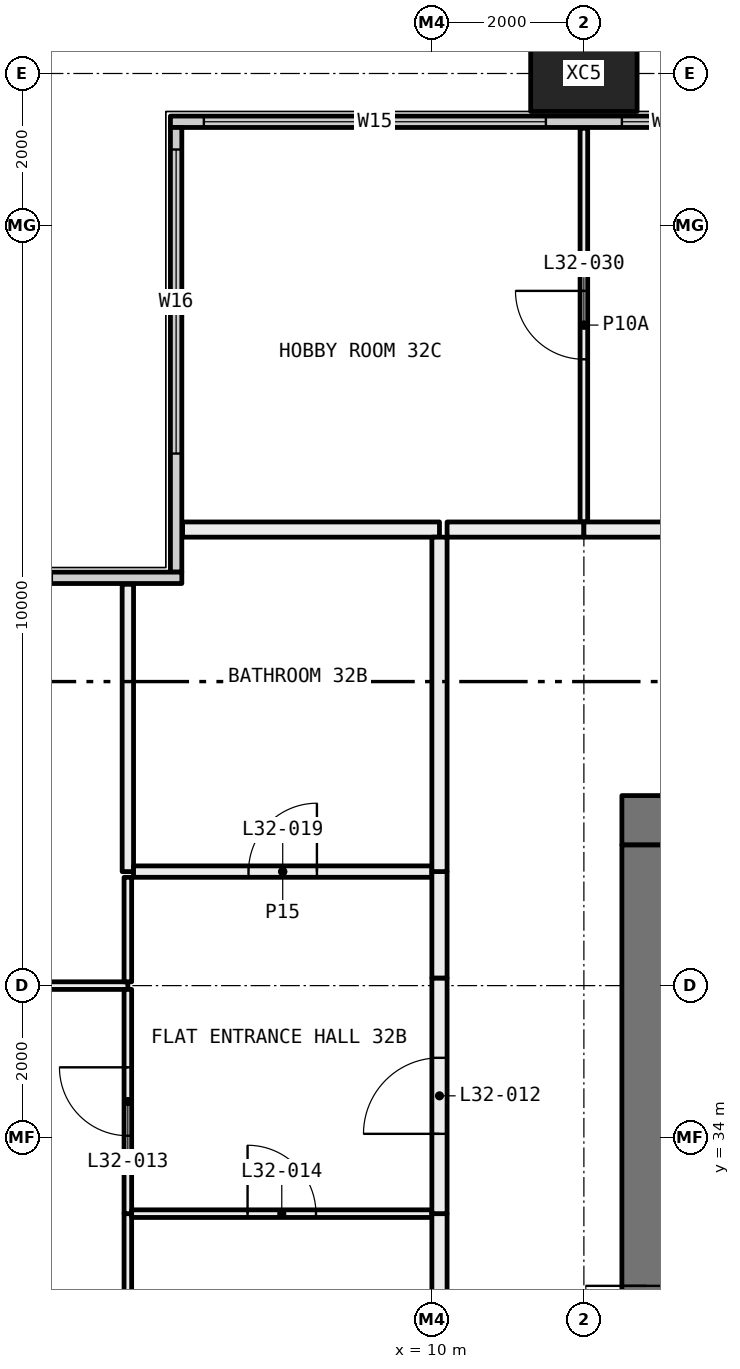
"""IFC4 building model, lengths in metres.
Left out: names, types, materials, properties, quantities, classifications, styles, units other than length and angle.
Written with IfcOpenShell. Run it as: python <this file> out.ifc"""

import sys

from ifc_helpers import new_model, si_unit, direction, frame, frame_2d, origin, origin_2d, place, context, subcontext, project, spatial, rectangle, hollow_rectangle, extrude, element, fill, save


model = new_model("IFC4")
c1 = context("Model", 3, precision=1e-05, world=origin(), true_north=direction((0.0, 1.0)))
c2 = subcontext(c1, "Body", "Model", "MODEL_VIEW")
j1 = project(units=[si_unit("LENGTHUNIT", "METRE"), si_unit("PLANEANGLEUNIT", "RADIAN")], contexts=[c1])
p1 = place(None, origin())
s1 = spatial("IfcSite", under=j1, at=p1, CompositionType="ELEMENT")
p2 = place(p1, origin())
s2 = spatial("IfcBuilding", under=s1, at=p2, CompositionType="ELEMENT")
p3 = place(p2, frame((0.0, 0.0, 124.2)))
s3 = spatial("IfcBuildingStorey", under=s2, at=p3, CompositionType="ELEMENT", Elevation=124.2)
p4 = place(p3, frame((12.0, 48.0, -0.4), z_axis=(0.0, 0.0, 1.0), x_axis=(1.0, 0.0, 0.0)))
e1 = element("IfcColumn", 1, at=p4, inside=s3, PredefinedType="COLUMN", context=c2, shape_type="SweptSolid", body=[
    extrude(hollow_rectangle(XDim=1.4, YDim=1.0, WallThickness=0.055, at=origin_2d()), origin(), (0.0, 0.0, 1.0), 3.45),
])
p5 = place(p3, frame((6.56, 47.365, 0.0), z_axis=(0.0, 0.0, 1.0), x_axis=(1.0, 0.0, 0.0)))
e2 = element("IfcWall", 2, at=p5, inside=s3, PredefinedType="ELEMENTEDWALL", context=c2, shape_type="SweptSolid", body=[
    extrude(rectangle(XDim=58.88, YDim=0.15, at=frame_2d((29.44, 0.0))), origin(), (0.0, 0.0, 1.0), 3.05),
])
p6 = place(p5, frame((0.44, 0.0, 0.45)))
e3 = element("IfcOpeningElement", 3, at=p6, cuts=e2, PredefinedType="OPENING", context=c2, shape_type="SweptSolid", body=[
    extrude(rectangle(XDim=4.5, YDim=2.55, at=frame_2d((2.25, 1.275))), frame((0.0, 0.085, 0.0), z_axis=(0.0, -1.0, 0.0), x_axis=(1.0, 0.0, 0.0)), (0.0, 0.0, 1.0), 0.17),
])
p7 = place(p5, frame((5.94, 0.0, 0.45)))
e4 = element("IfcOpeningElement", 4, at=p7, cuts=e2, PredefinedType="OPENING", context=c2, shape_type="SweptSolid", body=[
    extrude(rectangle(XDim=1.25, YDim=2.55, at=frame_2d((0.625, 1.275))), frame((0.0, 0.085, 0.0), z_axis=(0.0, -1.0, 0.0), x_axis=(1.0, 0.0, 0.0)), (0.0, 0.0, 1.0), 0.17),
])
p8 = place(p5, frame((10.19, 0.0, 0.45)))
e5 = element("IfcOpeningElement", 5, at=p8, cuts=e2, PredefinedType="OPENING", context=c2, shape_type="SweptSolid", body=[
    extrude(rectangle(XDim=0.75, YDim=2.55, at=frame_2d((0.375, 1.275))), frame((0.0, 0.085, 0.0), z_axis=(0.0, -1.0, 0.0), x_axis=(1.0, 0.0, 0.0)), (0.0, 0.0, 1.0), 0.17),
])
p9 = place(p5, frame((11.94, 0.0, 0.45)))
e6 = element("IfcOpeningElement", 6, at=p9, cuts=e2, PredefinedType="OPENING", context=c2, shape_type="SweptSolid", body=[
    extrude(rectangle(XDim=0.75, YDim=2.55, at=frame_2d((0.375, 1.275))), frame((0.0, 0.085, 0.0), z_axis=(0.0, -1.0, 0.0), x_axis=(1.0, 0.0, 0.0)), (0.0, 0.0, 1.0), 0.17),
])
p10 = place(p5, frame((15.69, 0.0, 0.45)))
e7 = element("IfcOpeningElement", 7, at=p10, cuts=e2, PredefinedType="OPENING", context=c2, shape_type="SweptSolid", body=[
    extrude(rectangle(XDim=1.25, YDim=2.55, at=frame_2d((0.625, 1.275))), frame((0.0, 0.085, 0.0), z_axis=(0.0, -1.0, 0.0), x_axis=(1.0, 0.0, 0.0)), (0.0, 0.0, 1.0), 0.17),
])
p11 = place(p5, frame((17.94, 0.0, 0.45)))
e8 = element("IfcOpeningElement", 8, at=p11, cuts=e2, PredefinedType="OPENING", context=c2, shape_type="SweptSolid", body=[
    extrude(rectangle(XDim=1.25, YDim=2.55, at=frame_2d((0.625, 1.275))), frame((0.0, 0.085, 0.0), z_axis=(0.0, -1.0, 0.0), x_axis=(1.0, 0.0, 0.0)), (0.0, 0.0, 1.0), 0.17),
])
p12 = place(p5, frame((22.19, 0.0, 0.45)))
e9 = element("IfcOpeningElement", 9, at=p12, cuts=e2, PredefinedType="OPENING", context=c2, shape_type="SweptSolid", body=[
    extrude(rectangle(XDim=0.75, YDim=2.55, at=frame_2d((0.375, 1.275))), frame((0.0, 0.085, 0.0), z_axis=(0.0, -1.0, 0.0), x_axis=(1.0, 0.0, 0.0)), (0.0, 0.0, 1.0), 0.17),
])
p13 = place(p5, frame((23.94, 0.0, 0.45)))
e10 = element("IfcOpeningElement", 10, at=p13, cuts=e2, PredefinedType="OPENING", context=c2, shape_type="SweptSolid", body=[
    extrude(rectangle(XDim=0.75, YDim=2.55, at=frame_2d((0.375, 1.275))), frame((0.0, 0.085, 0.0), z_axis=(0.0, -1.0, 0.0), x_axis=(1.0, 0.0, 0.0)), (0.0, 0.0, 1.0), 0.17),
])
p14 = place(p5, frame((27.69, 0.0, 0.45)))
e11 = element("IfcOpeningElement", 11, at=p14, cuts=e2, PredefinedType="OPENING", context=c2, shape_type="SweptSolid", body=[
    extrude(rectangle(XDim=1.25, YDim=2.55, at=frame_2d((0.625, 1.275))), frame((0.0, 0.085, 0.0), z_axis=(0.0, -1.0, 0.0), x_axis=(1.0, 0.0, 0.0)), (0.0, 0.0, 1.0), 0.17),
])
p15 = place(p5, frame((29.94, 0.0, 0.45)))
e12 = element("IfcOpeningElement", 12, at=p15, cuts=e2, PredefinedType="OPENING", context=c2, shape_type="SweptSolid", body=[
    extrude(rectangle(XDim=1.25, YDim=2.55, at=frame_2d((0.625, 1.275))), frame((0.0, 0.085, 0.0), z_axis=(0.0, -1.0, 0.0), x_axis=(1.0, 0.0, 0.0)), (0.0, 0.0, 1.0), 0.17),
])
p16 = place(p5, frame((34.19, 0.0, 0.45)))
e13 = element("IfcOpeningElement", 13, at=p16, cuts=e2, PredefinedType="OPENING", context=c2, shape_type="SweptSolid", body=[
    extrude(rectangle(XDim=0.75, YDim=2.55, at=frame_2d((0.375, 1.275))), frame((0.0, 0.085, 0.0), z_axis=(0.0, -1.0, 0.0), x_axis=(1.0, 0.0, 0.0)), (0.0, 0.0, 1.0), 0.17),
])
p17 = place(p5, frame((35.94, 0.0, 0.45)))
e14 = element("IfcOpeningElement", 14, at=p17, cuts=e2, PredefinedType="OPENING", context=c2, shape_type="SweptSolid", body=[
    extrude(rectangle(XDim=0.75, YDim=2.55, at=frame_2d((0.375, 1.275))), frame((0.0, 0.085, 0.0), z_axis=(0.0, -1.0, 0.0), x_axis=(1.0, 0.0, 0.0)), (0.0, 0.0, 1.0), 0.17),
])
p18 = place(p5, frame((39.69, 0.0, 0.45)))
e15 = element("IfcOpeningElement", 15, at=p18, cuts=e2, PredefinedType="OPENING", context=c2, shape_type="SweptSolid", body=[
    extrude(rectangle(XDim=1.25, YDim=2.55, at=frame_2d((0.625, 1.275))), frame((0.0, 0.085, 0.0), z_axis=(0.0, -1.0, 0.0), x_axis=(1.0, 0.0, 0.0)), (0.0, 0.0, 1.0), 0.17),
])
p19 = place(p5, frame((41.94, 0.0, 0.45)))
e16 = element("IfcOpeningElement", 16, at=p19, cuts=e2, PredefinedType="OPENING", context=c2, shape_type="SweptSolid", body=[
    extrude(rectangle(XDim=1.25, YDim=2.55, at=frame_2d((0.625, 1.275))), frame((0.0, 0.085, 0.0), z_axis=(0.0, -1.0, 0.0), x_axis=(1.0, 0.0, 0.0)), (0.0, 0.0, 1.0), 0.17),
])
p20 = place(p5, frame((46.19, 0.0, 0.45)))
e17 = element("IfcOpeningElement", 17, at=p20, cuts=e2, PredefinedType="OPENING", context=c2, shape_type="SweptSolid", body=[
    extrude(rectangle(XDim=0.75, YDim=2.55, at=frame_2d((0.375, 1.275))), frame((0.0, 0.085, 0.0), z_axis=(0.0, -1.0, 0.0), x_axis=(1.0, 0.0, 0.0)), (0.0, 0.0, 1.0), 0.17),
])
p21 = place(p5, frame((47.94, 0.0, 0.45)))
e18 = element("IfcOpeningElement", 18, at=p21, cuts=e2, PredefinedType="OPENING", context=c2, shape_type="SweptSolid", body=[
    extrude(rectangle(XDim=0.75, YDim=2.55, at=frame_2d((0.375, 1.275))), frame((0.0, 0.085, 0.0), z_axis=(0.0, -1.0, 0.0), x_axis=(1.0, 0.0, 0.0)), (0.0, 0.0, 1.0), 0.17),
])
p22 = place(p5, frame((51.69, 0.0, 0.45)))
e19 = element("IfcOpeningElement", 19, at=p22, cuts=e2, PredefinedType="OPENING", context=c2, shape_type="SweptSolid", body=[
    extrude(rectangle(XDim=1.25, YDim=2.55, at=frame_2d((0.625, 1.275))), frame((0.0, 0.085, 0.0), z_axis=(0.0, -1.0, 0.0), x_axis=(1.0, 0.0, 0.0)), (0.0, 0.0, 1.0), 0.17),
])
p23 = place(p5, frame((53.94, 0.0, 0.45)))
e20 = element("IfcOpeningElement", 20, at=p23, cuts=e2, PredefinedType="OPENING", context=c2, shape_type="SweptSolid", body=[
    extrude(rectangle(XDim=4.5, YDim=2.55, at=frame_2d((2.25, 1.275))), frame((0.0, 0.085, 0.0), z_axis=(0.0, -1.0, 0.0), x_axis=(1.0, 0.0, 0.0)), (0.0, 0.0, 1.0), 0.17),
])
p24 = place(p3, frame((6.635, 41.44, 0.0), z_axis=(0.0, 0.0, 1.0), x_axis=(0.0, 1.0, 0.0)))
e21 = element("IfcWall", 21, at=p24, inside=s3, PredefinedType="ELEMENTEDWALL", context=c2, shape_type="SweptSolid", body=[
    extrude(rectangle(XDim=5.85, YDim=0.15, at=frame_2d((2.925, 0.0))), origin(), (0.0, 0.0, 1.0), 3.05),
])
p25 = place(p24, frame((1.56, 0.0, 0.45)))
e22 = element("IfcOpeningElement", 22, at=p25, cuts=e21, PredefinedType="OPENING", context=c2, shape_type="SweptSolid", body=[
    extrude(rectangle(XDim=4.0, YDim=2.55, at=frame_2d((2.0, 1.275))), frame((0.0, 0.085, 0.0), z_axis=(0.0, -1.0, 0.0), x_axis=(1.0, 0.0, 0.0)), (0.0, 0.0, 1.0), 0.17),
])
p26 = place(p3, frame((0.56, 41.365, 0.0), z_axis=(0.0, 0.0, 1.0), x_axis=(1.0, 0.0, 0.0)))
e23 = element("IfcWall", 23, at=p26, inside=s3, PredefinedType="ELEMENTEDWALL", context=c2, shape_type="SweptSolid", body=[
    extrude(rectangle(XDim=6.15, YDim=0.15, at=frame_2d((3.075, 0.0))), origin(), (0.0, 0.0, 1.0), 3.05),
])
p27 = place(p26, frame((0.44, 0.0, 0.45)))
e24 = element("IfcOpeningElement", 24, at=p27, cuts=e23, PredefinedType="OPENING", context=c2, shape_type="SweptSolid", body=[
    extrude(rectangle(XDim=4.0, YDim=2.55, at=frame_2d((2.0, 1.275))), frame((0.0, 0.085, 0.0), z_axis=(0.0, -1.0, 0.0), x_axis=(1.0, 0.0, 0.0)), (0.0, 0.0, 1.0), 0.17),
])
p28 = place(p3, frame((6.0, 36.0, 0.0), z_axis=(0.0, 0.0, 1.0), x_axis=(-1.0, 0.0, 0.0)))
e25 = element("IfcWall", 25, at=p28, inside=s3, PredefinedType="PARTITIONING", context=c2, shape_type="SweptSolid", body=[
    extrude(rectangle(XDim=5.28, YDim=0.1, at=frame_2d((2.64, 0.0))), origin(), (0.0, 0.0, 1.0), 2.45),
])
p29 = place(p28, frame((2.19, 0.0, 0.0)))
e26 = element("IfcOpeningElement", 26, at=p29, cuts=e25, PredefinedType="OPENING", context=c2, shape_type="SweptSolid", body=[
    extrude(rectangle(XDim=0.9, YDim=2.1, at=frame_2d((0.45, 1.05))), frame((0.0, 0.06, 0.0), z_axis=(0.0, -1.0, 0.0), x_axis=(1.0, 0.0, 0.0)), (0.0, 0.0, 1.0), 0.12),
])
p30 = place(p3, frame((6.0, 24.05, 0.0), z_axis=(0.0, 0.0, 1.0), x_axis=(0.0, 1.0, 0.0)))
e27 = element("IfcWall", 27, at=p30, inside=s3, PredefinedType="PARTITIONING", context=c2, shape_type="SweptSolid", body=[
    extrude(rectangle(XDim=8.95, YDim=0.1, at=frame_2d((4.475, 0.0))), origin(), (0.0, 0.0, 1.0), 2.45),
])
p31 = place(p3, frame((6.0, 33.0, 0.0), z_axis=(0.0, 0.0, 1.0), x_axis=(0.0, 1.0, 0.0)))
e28 = element("IfcWall", 28, at=p31, inside=s3, PredefinedType="PARTITIONING", context=c2, shape_type="SweptSolid", body=[
    extrude(rectangle(XDim=2.95, YDim=0.1, at=frame_2d((1.475, 0.0))), origin(), (0.0, 0.0, 1.0), 2.45),
])
p32 = place(p31, frame((1.025, 0.0, 0.0)))
e29 = element("IfcOpeningElement", 29, at=p32, cuts=e28, PredefinedType="OPENING", context=c2, shape_type="SweptSolid", body=[
    extrude(rectangle(XDim=0.9, YDim=2.1, at=frame_2d((0.45, 1.05))), frame((0.0, 0.06, 0.0), z_axis=(0.0, -1.0, 0.0), x_axis=(1.0, 0.0, 0.0)), (0.0, 0.0, 1.0), 0.12),
])
p33 = place(p3, frame((6.0, 36.05, 0.0), z_axis=(0.0, 0.0, 1.0), x_axis=(0.0, 1.0, 0.0)))
e30 = element("IfcWall", 30, at=p33, inside=s3, PredefinedType="PARTITIONING", context=c2, shape_type="SweptSolid", body=[
    extrude(rectangle(XDim=1.375, YDim=0.1, at=frame_2d((0.688, 0.0))), origin(), (0.0, 0.0, 1.0), 2.45),
])
p34 = place(p3, frame((6.0, 37.5, 0.0), z_axis=(0.0, 0.0, 1.0), x_axis=(0.0, 1.0, 0.0)))
e31 = element("IfcWall", 31, at=p34, inside=s3, PredefinedType="PARTITIONING", context=c2, shape_type="SweptSolid", body=[
    extrude(rectangle(XDim=3.78, YDim=0.15, at=frame_2d((1.89, 0.0))), origin(), (0.0, 0.0, 1.0), 3.05),
])
p35 = place(p3, frame((10.0, 33.0, 0.0), z_axis=(0.0, 0.0, 1.0), x_axis=(-1.0, 0.0, 0.0)))
e32 = element("IfcWall", 32, at=p35, inside=s3, PredefinedType="PARTITIONING", context=c2, shape_type="SweptSolid", body=[
    extrude(rectangle(XDim=3.95, YDim=0.1, at=frame_2d((1.975, 0.0))), origin(), (0.0, 0.0, 1.0), 3.05),
])
p36 = place(p35, frame((1.525, 0.0, 0.0)))
e33 = element("IfcOpeningElement", 33, at=p36, cuts=e32, PredefinedType="OPENING", context=c2, shape_type="SweptSolid", body=[
    extrude(rectangle(XDim=0.9, YDim=2.1, at=frame_2d((0.45, 1.05))), frame((0.0, 0.06, 0.0), z_axis=(0.0, -1.0, 0.0), x_axis=(1.0, 0.0, 0.0)), (0.0, 0.0, 1.0), 0.12),
])
p37 = place(p3, frame((10.1, 24.1, 0.0), z_axis=(0.0, 0.0, 1.0), x_axis=(0.0, 1.0, 0.0)))
e34 = element("IfcWall", 34, at=p37, inside=s3, PredefinedType="PARTITIONING", context=c2, shape_type="SweptSolid", body=[
    extrude(rectangle(XDim=8.9, YDim=0.2, at=frame_2d((4.45, 0.0))), origin(), (0.0, 0.0, 1.0), 3.05),
])
p38 = place(p3, frame((10.0, 37.5, 0.0), z_axis=(0.0, 0.0, 1.0), x_axis=(-1.0, 0.0, 0.0)))
e35 = element("IfcWall", 35, at=p38, inside=s3, PredefinedType="PARTITIONING", context=c2, shape_type="SweptSolid", body=[
    extrude(rectangle(XDim=3.925, YDim=0.15, at=frame_2d((1.962, 0.0))), origin(), (0.0, 0.0, 1.0), 3.05),
])
p39 = place(p38, frame((1.512, 0.0, 0.0)))
e36 = element("IfcOpeningElement", 36, at=p39, cuts=e35, PredefinedType="OPENING", context=c2, shape_type="SweptSolid", body=[
    extrude(rectangle(XDim=0.9, YDim=2.1, at=frame_2d((0.45, 1.05))), frame((0.0, 0.085, 0.0), z_axis=(0.0, -1.0, 0.0), x_axis=(1.0, 0.0, 0.0)), (0.0, 0.0, 1.0), 0.17),
])
p40 = place(p3, frame((10.1, 33.0, 0.0), z_axis=(0.0, 0.0, 1.0), x_axis=(0.0, 1.0, 0.0)))
e37 = element("IfcWall", 37, at=p40, inside=s3, PredefinedType="PARTITIONING", context=c2, shape_type="SweptSolid", body=[
    extrude(rectangle(XDim=3.1, YDim=0.2, at=frame_2d((1.55, 0.0))), origin(), (0.0, 0.0, 1.0), 2.45),
])
p41 = place(p40, frame((1.05, 0.0, 0.0)))
e38 = element("IfcOpeningElement", 38, at=p41, cuts=e37, PredefinedType="OPENING", context=c2, shape_type="SweptSolid", body=[
    extrude(rectangle(XDim=1.0, YDim=2.1, at=frame_2d((0.5, 1.05))), frame((0.0, 0.11, 0.0), z_axis=(0.0, -1.0, 0.0), x_axis=(1.0, 0.0, 0.0)), (0.0, 0.0, 1.0), 0.22),
])
p42 = place(p3, frame((10.1, 36.1, 0.0), z_axis=(0.0, 0.0, 1.0), x_axis=(0.0, 1.0, 0.0)))
e39 = element("IfcWall", 39, at=p42, inside=s3, PredefinedType="PARTITIONING", context=c2, shape_type="SweptSolid", body=[
    extrude(rectangle(XDim=1.4, YDim=0.2, at=frame_2d((0.7, 0.0))), origin(), (0.0, 0.0, 1.0), 3.05),
])
p43 = place(p3, frame((10.1, 42.0, 0.0), z_axis=(0.0, 0.0, 1.0), x_axis=(-1.0, 0.0, 0.0)))
e40 = element("IfcWall", 40, at=p43, inside=s3, PredefinedType="PARTITIONING", context=c2, shape_type="SweptSolid", body=[
    extrude(rectangle(XDim=3.38, YDim=0.2, at=frame_2d((1.69, 0.0))), origin(), (0.0, 0.0, 1.0), 3.05),
])
p44 = place(p3, frame((10.1, 37.5, 0.0), z_axis=(0.0, 0.0, 1.0), x_axis=(0.0, 1.0, 0.0)))
e41 = element("IfcWall", 41, at=p44, inside=s3, PredefinedType="PARTITIONING", context=c2, shape_type="SweptSolid", body=[
    extrude(rectangle(XDim=4.4, YDim=0.2, at=frame_2d((2.2, 0.0))), origin(), (0.0, 0.0, 1.0), 3.05),
])
p45 = place(p3, frame((12.0, 42.1, 0.0), z_axis=(0.0, 0.0, 1.0), x_axis=(0.0, 1.0, 0.0)))
e42 = element("IfcWall", 42, at=p45, inside=s3, PredefinedType="PARTITIONING", context=c2, shape_type="SweptSolid", body=[
    extrude(rectangle(XDim=5.18, YDim=0.1, at=frame_2d((2.59, 0.0))), origin(), (0.0, 0.0, 1.0), 3.05),
])
p46 = place(p45, frame((2.14, 0.0, 0.0)))
e43 = element("IfcOpeningElement", 43, at=p46, cuts=e42, PredefinedType="OPENING", context=c2, shape_type="SweptSolid", body=[
    extrude(rectangle(XDim=0.9, YDim=2.1, at=frame_2d((0.45, 1.05))), frame((0.0, 0.06, 0.0), z_axis=(0.0, -1.0, 0.0), x_axis=(1.0, 0.0, 0.0)), (0.0, 0.0, 1.0), 0.12),
])
p47 = place(p3, frame((10.2, 42.0, 0.0), z_axis=(0.0, 0.0, 1.0), x_axis=(1.0, 0.0, 0.0)))
e44 = element("IfcWall", 44, at=p47, inside=s3, PredefinedType="PARTITIONING", context=c2, shape_type="SweptSolid", body=[
    extrude(rectangle(XDim=1.8, YDim=0.2, at=frame_2d((0.9, 0.0))), origin(), (0.0, 0.0, 1.0), 3.05),
])
p48 = place(p3, frame((12.0, 42.0, 0.0), z_axis=(0.0, 0.0, 1.0), x_axis=(1.0, 0.0, 0.0)))
e45 = element("IfcWall", 45, at=p48, inside=s3, PredefinedType="PARTITIONING", context=c2, shape_type="SweptSolid", body=[
    extrude(rectangle(XDim=6.0, YDim=0.2, at=frame_2d((3.0, 0.0))), origin(), (0.0, 0.0, 1.0), 3.05),
])
p49 = place(p3, frame((12.5, 38.175, 0.0), z_axis=(0.0, 0.0, 1.0), x_axis=(1.0, 0.0, 0.0)))
e46 = element("IfcWall", 46, at=p49, inside=s3, PredefinedType="SHEAR", context=c2, shape_type="SweptSolid", body=[
    extrude(rectangle(XDim=11.0, YDim=0.65, at=frame_2d((5.5, 0.0))), origin(), (0.0, 0.0, 1.0), 3.05),
])
p50 = place(p49, frame((8.475, 0.0, 0.0)))
e47 = element("IfcOpeningElement", 47, at=p50, cuts=e46, PredefinedType="OPENING", context=c2, shape_type="SweptSolid", body=[
    extrude(rectangle(XDim=1.6, YDim=2.1, at=frame_2d((0.8, 1.05))), frame((0.0, 0.335, 0.0), z_axis=(0.0, -1.0, 0.0), x_axis=(1.0, 0.0, 0.0)), (0.0, 0.0, 1.0), 0.67),
])
p51 = place(p3, frame((12.825, 22.15, 0.0), z_axis=(0.0, 0.0, 1.0), x_axis=(0.0, 1.0, 0.0)))
e48 = element("IfcWall", 48, at=p51, inside=s3, PredefinedType="SHEAR", context=c2, shape_type="SweptSolid", body=[
    extrude(rectangle(XDim=15.7, YDim=0.65, at=frame_2d((7.85, 0.0))), origin(), (0.0, 0.0, 1.0), 3.05),
])
p52 = place(p51, frame((8.3, 0.0, 0.0)))
e49 = element("IfcOpeningElement", 49, at=p52, cuts=e48, PredefinedType="OPENING", context=c2, shape_type="SweptSolid", body=[
    extrude(rectangle(XDim=1.6, YDim=2.1, at=frame_2d((0.8, 1.05))), frame((0.0, 0.335, 0.0), z_axis=(0.0, -1.0, 0.0), x_axis=(1.0, 0.0, 0.0)), (0.0, 0.0, 1.0), 0.67),
])
p53 = place(p51, frame((2.125, 0.0, 0.0)))
e50 = element("IfcOpeningElement", 50, at=p53, cuts=e48, PredefinedType="OPENING", context=c2, shape_type="SweptSolid", body=[
    extrude(rectangle(XDim=1.0, YDim=2.1, at=frame_2d((0.5, 1.05))), frame((0.0, 0.335, 0.0), z_axis=(0.0, -1.0, 0.0), x_axis=(1.0, 0.0, 0.0)), (0.0, 0.0, 1.0), 0.67),
])
p54 = place(p6, origin())
e51 = element("IfcWindow", 51, at=p54, inside=s3, PartitioningType="SINGLE_PANEL", PredefinedType="WINDOW", context=c2, shape_type="SweptSolid", body=[
    extrude(rectangle(XDim=4.5, YDim=2.55, at=frame_2d((2.25, 1.275))), frame((0.0, 0.03, 0.0), z_axis=(0.0, -1.0, 0.0), x_axis=(1.0, 0.0, 0.0)), (0.0, 0.0, 1.0), 0.06),
])
fill(e3, e51)
p55 = place(p7, origin())
e52 = element("IfcWindow", 52, at=p55, inside=s3, PartitioningType="SINGLE_PANEL", PredefinedType="WINDOW", context=c2, shape_type="SweptSolid", body=[
    extrude(rectangle(XDim=1.25, YDim=2.55, at=frame_2d((0.625, 1.275))), frame((0.0, 0.03, 0.0), z_axis=(0.0, -1.0, 0.0), x_axis=(1.0, 0.0, 0.0)), (0.0, 0.0, 1.0), 0.06),
])
fill(e4, e52)
p56 = place(p25, origin())
e53 = element("IfcWindow", 53, at=p56, inside=s3, PartitioningType="SINGLE_PANEL", PredefinedType="WINDOW", context=c2, shape_type="SweptSolid", body=[
    extrude(rectangle(XDim=4.0, YDim=2.55, at=frame_2d((2.0, 1.275))), frame((0.0, 0.03, 0.0), z_axis=(0.0, -1.0, 0.0), x_axis=(1.0, 0.0, 0.0)), (0.0, 0.0, 1.0), 0.06),
])
fill(e22, e53)
p57 = place(p41, origin())
e54 = element("IfcDoor", 54, at=p57, inside=s3, OperationType="SINGLE_SWING_RIGHT", PredefinedType="DOOR", context=c2, shape_type="SweptSolid", body=[
    extrude(rectangle(XDim=1.0, YDim=2.1, at=frame_2d((0.5, 1.05))), frame((0.0, 0.025, 0.0), z_axis=(0.0, -1.0, 0.0), x_axis=(1.0, 0.0, 0.0)), (0.0, 0.0, 1.0), 0.05),
])
fill(e38, e54)
p58 = place(p32, origin())
e55 = element("IfcDoor", 55, at=p58, inside=s3, OperationType="SINGLE_SWING_LEFT", PredefinedType="DOOR", context=c2, shape_type="SweptSolid", body=[
    extrude(rectangle(XDim=0.9, YDim=2.1, at=frame_2d((0.45, 1.05))), frame((0.0, 0.025, 0.0), z_axis=(0.0, -1.0, 0.0), x_axis=(1.0, 0.0, 0.0)), (0.0, 0.0, 1.0), 0.05),
])
fill(e29, e55)
p59 = place(p36, frame((0.9, 0.0, 0.0), x_axis=(-1.0, 0.0, 0.0)))
e56 = element("IfcDoor", 56, at=p59, inside=s3, OperationType="SINGLE_SWING_RIGHT", PredefinedType="DOOR", context=c2, shape_type="SweptSolid", body=[
    extrude(rectangle(XDim=0.9, YDim=2.1, at=frame_2d((0.45, 1.05))), frame((0.0, 0.025, 0.0), z_axis=(0.0, -1.0, 0.0), x_axis=(1.0, 0.0, 0.0)), (0.0, 0.0, 1.0), 0.05),
])
fill(e33, e56)
p60 = place(p39, frame((0.9, 0.0, 0.0), x_axis=(-1.0, 0.0, 0.0)))
e57 = element("IfcDoor", 57, at=p60, inside=s3, OperationType="SINGLE_SWING_LEFT", PredefinedType="DOOR", context=c2, shape_type="SweptSolid", body=[
    extrude(rectangle(XDim=0.9, YDim=2.1, at=frame_2d((0.45, 1.05))), frame((0.0, 0.025, 0.0), z_axis=(0.0, -1.0, 0.0), x_axis=(1.0, 0.0, 0.0)), (0.0, 0.0, 1.0), 0.05),
])
fill(e36, e57)
p61 = place(p46, origin())
e58 = element("IfcDoor", 58, at=p61, inside=s3, OperationType="SINGLE_SWING_LEFT", PredefinedType="DOOR", context=c2, shape_type="SweptSolid", body=[
    extrude(rectangle(XDim=0.9, YDim=2.1, at=frame_2d((0.45, 1.05))), frame((0.0, 0.025, 0.0), z_axis=(0.0, -1.0, 0.0), x_axis=(1.0, 0.0, 0.0)), (0.0, 0.0, 1.0), 0.05),
])
fill(e43, e58)
p62 = place(p52, origin())
e59 = element("IfcDoor", 59, at=p62, inside=s3, OperationType="DOUBLE_DOOR_SINGLE_SWING", PredefinedType="DOOR", context=c2, shape_type="SweptSolid", body=[
    extrude(rectangle(XDim=1.6, YDim=2.1, at=frame_2d((0.8, 1.05))), frame((0.0, 0.025, 0.0), z_axis=(0.0, -1.0, 0.0), x_axis=(1.0, 0.0, 0.0)), (0.0, 0.0, 1.0), 0.05),
])
fill(e49, e59)
save(model, sys.argv[1])
